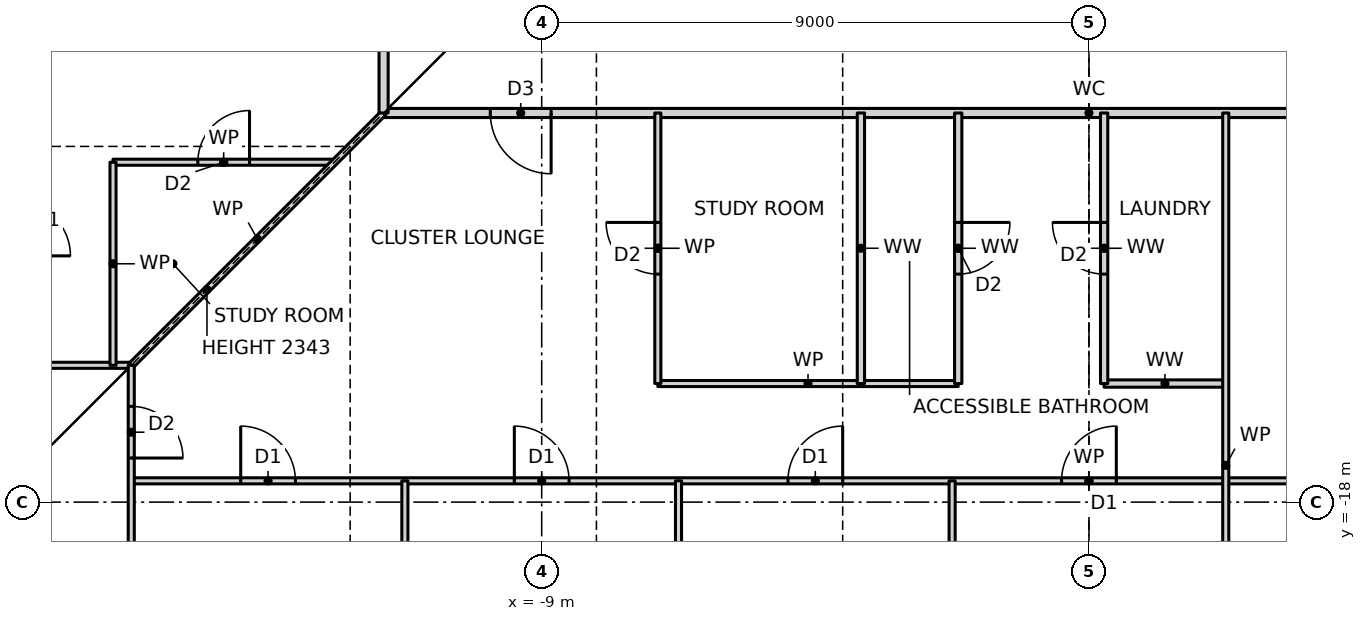
"""IFC4 building model, lengths in metres.
Left out: names, types, materials, properties, quantities, classifications, styles, units other than length and angle.
Written with IfcOpenShell. Run it as: python <this file> out.ifc"""

import sys

from ifc_helpers import new_model, si_unit, direction, frame, frame_2d, origin, place, context, subcontext, project, spatial, rectangle, extrude, element, fill, save


model = new_model("IFC4")
c1 = context("Model", 3, precision=1e-05, world=origin(), true_north=direction((0.0, 1.0)))
c2 = subcontext(c1, "Body", "Model", "MODEL_VIEW")
j1 = project(units=[si_unit("LENGTHUNIT", "METRE"), si_unit("PLANEANGLEUNIT", "RADIAN")], contexts=[c1])
p1 = place(None, origin())
s1 = spatial("IfcSite", under=j1, at=p1, CompositionType="ELEMENT")
p2 = place(p1, origin())
s2 = spatial("IfcBuilding", under=s1, at=p2, CompositionType="ELEMENT")
p3 = place(p2, frame((0.0, 0.0, 57.0)))
s3 = spatial("IfcBuildingStorey", under=s2, at=p3, CompositionType="ELEMENT", Elevation=57.0)
p4 = place(p3, frame((-15.75, -17.65, 0.0), z_axis=(0.0, 0.0, 1.0), x_axis=(1.0, 0.0, 0.0)))
e1 = element("IfcWall", 1, at=p4, inside=s3, PredefinedType="PARTITIONING", context=c2, shape_type="SweptSolid", body=[
    extrude(rectangle(XDim=31.5, YDim=0.1, at=frame_2d((15.75, 0.0))), origin(), (0.0, 0.0, 1.0), 3.27),
])
p5 = place(p4, frame((1.8, 0.0, 0.0)))
e2 = element("IfcOpeningElement", 2, at=p5, cuts=e1, PredefinedType="OPENING", context=c2, shape_type="SweptSolid", body=[
    extrude(rectangle(XDim=0.9, YDim=2.1, at=frame_2d((0.45, 1.05))), frame((0.0, 0.06, 0.0), z_axis=(0.0, -1.0, 0.0), x_axis=(1.0, 0.0, 0.0)), (0.0, 0.0, 1.0), 0.12),
])
p6 = place(p4, frame((6.3, 0.0, 0.0)))
e3 = element("IfcOpeningElement", 3, at=p6, cuts=e1, PredefinedType="OPENING", context=c2, shape_type="SweptSolid", body=[
    extrude(rectangle(XDim=0.9, YDim=2.1, at=frame_2d((0.45, 1.05))), frame((0.0, 0.06, 0.0), z_axis=(0.0, -1.0, 0.0), x_axis=(1.0, 0.0, 0.0)), (0.0, 0.0, 1.0), 0.12),
])
p7 = place(p4, frame((10.8, 0.0, 0.0)))
e4 = element("IfcOpeningElement", 4, at=p7, cuts=e1, PredefinedType="OPENING", context=c2, shape_type="SweptSolid", body=[
    extrude(rectangle(XDim=0.9, YDim=2.1, at=frame_2d((0.45, 1.05))), frame((0.0, 0.06, 0.0), z_axis=(0.0, -1.0, 0.0), x_axis=(1.0, 0.0, 0.0)), (0.0, 0.0, 1.0), 0.12),
])
p8 = place(p4, frame((15.3, 0.0, 0.0)))
e5 = element("IfcOpeningElement", 5, at=p8, cuts=e1, PredefinedType="OPENING", context=c2, shape_type="SweptSolid", body=[
    extrude(rectangle(XDim=0.9, YDim=2.1, at=frame_2d((0.45, 1.05))), frame((0.0, 0.06, 0.0), z_axis=(0.0, -1.0, 0.0), x_axis=(1.0, 0.0, 0.0)), (0.0, 0.0, 1.0), 0.12),
])
p9 = place(p4, frame((19.8, 0.0, 0.0)))
e6 = element("IfcOpeningElement", 6, at=p9, cuts=e1, PredefinedType="OPENING", context=c2, shape_type="SweptSolid", body=[
    extrude(rectangle(XDim=0.9, YDim=2.1, at=frame_2d((0.45, 1.05))), frame((0.0, 0.06, 0.0), z_axis=(0.0, -1.0, 0.0), x_axis=(1.0, 0.0, 0.0)), (0.0, 0.0, 1.0), 0.12),
])
p10 = place(p4, frame((24.3, 0.0, 0.0)))
e7 = element("IfcOpeningElement", 7, at=p10, cuts=e1, PredefinedType="OPENING", context=c2, shape_type="SweptSolid", body=[
    extrude(rectangle(XDim=0.9, YDim=2.1, at=frame_2d((0.45, 1.05))), frame((0.0, 0.06, 0.0), z_axis=(0.0, -1.0, 0.0), x_axis=(1.0, 0.0, 0.0)), (0.0, 0.0, 1.0), 0.12),
])
p11 = place(p4, frame((28.8, 0.0, 0.0)))
e8 = element("IfcOpeningElement", 8, at=p11, cuts=e1, PredefinedType="OPENING", context=c2, shape_type="SweptSolid", body=[
    extrude(rectangle(XDim=0.9, YDim=2.1, at=frame_2d((0.45, 1.05))), frame((0.0, 0.06, 0.0), z_axis=(0.0, -1.0, 0.0), x_axis=(1.0, 0.0, 0.0)), (0.0, 0.0, 1.0), 0.12),
])
p12 = place(p3, frame((-7.09, -16.05, 0.0), z_axis=(0.0, 0.0, 1.0), x_axis=(1.0, 0.0, 0.0)))
e9 = element("IfcWall", 9, at=p12, inside=s3, PredefinedType="PARTITIONING", context=c2, shape_type="SweptSolid", body=[
    extrude(rectangle(XDim=4.94, YDim=0.1, at=frame_2d((2.47, 0.0))), origin(), (0.0, 0.0, 1.0), 3.27),
])
p13 = place(p3, frame((0.25, -16.05, 0.0), z_axis=(0.0, 0.0, 1.0), x_axis=(1.0, 0.0, 0.0)))
e10 = element("IfcWall", 10, at=p13, inside=s3, PredefinedType="PARTITIONING", context=c2, shape_type="SweptSolid", body=[
    extrude(rectangle(XDim=2.0, YDim=0.12, at=frame_2d((1.0, 0.0))), origin(), (0.0, 0.0, 1.0), 3.27),
])
p14 = place(p3, frame((-23.19, -15.75, 0.0), z_axis=(0.0, 0.0, 1.0), x_axis=(1.0, 0.0, 0.0)))
e11 = element("IfcWall", 11, at=p14, inside=s3, PredefinedType="PARTITIONING", context=c2, shape_type="SweptSolid", body=[
    extrude(rectangle(XDim=7.44, YDim=0.1, at=frame_2d((3.72, 0.0))), origin(), (0.0, 0.0, 1.0), 3.27),
])
p15 = place(p3, frame((-16.05, -12.41, 0.0), z_axis=(0.0, 0.0, 1.0), x_axis=(1.0, 0.0, 0.0)))
e12 = element("IfcWall", 12, at=p15, inside=s3, PredefinedType="PARTITIONING", context=c2, shape_type="SweptSolid", body=[
    extrude(rectangle(XDim=3.64, YDim=0.1, at=frame_2d((1.82, 0.0))), origin(), (0.0, 0.0, 1.0), 3.27),
])
p16 = place(p15, frame((1.395, 0.0, 0.0)))
e13 = element("IfcOpeningElement", 13, at=p16, cuts=e12, PredefinedType="OPENING", context=c2, shape_type="SweptSolid", body=[
    extrude(rectangle(XDim=0.85, YDim=2.1, at=frame_2d((0.425, 1.05))), frame((0.0, 0.06, 0.0), z_axis=(0.0, -1.0, 0.0), x_axis=(1.0, 0.0, 0.0)), (0.0, 0.0, 1.0), 0.12),
])
p17 = place(p3, frame((-11.6, -11.6, 0.0), z_axis=(0.0, 0.0, 1.0), x_axis=(1.0, 0.0, 0.0)))
e14 = element("IfcWall", 14, at=p17, inside=s3, PredefinedType="PARTITIONING", context=c2, shape_type="SweptSolid", body=[
    extrude(rectangle(XDim=23.2, YDim=0.15, at=frame_2d((11.6, 0.0))), origin(), (0.0, 0.0, 1.0), 3.27),
])
p18 = place(p17, frame((1.755, 0.0, 0.0)))
e15 = element("IfcOpeningElement", 15, at=p18, cuts=e14, PredefinedType="OPENING", context=c2, shape_type="SweptSolid", body=[
    extrude(rectangle(XDim=1.0, YDim=2.1, at=frame_2d((0.5, 1.05))), frame((0.0, 0.085, 0.0), z_axis=(0.0, -1.0, 0.0), x_axis=(1.0, 0.0, 0.0)), (0.0, 0.0, 1.0), 0.17),
])
p19 = place(p17, frame((21.025, 0.0, 0.0)))
e16 = element("IfcOpeningElement", 16, at=p19, cuts=e14, PredefinedType="OPENING", context=c2, shape_type="SweptSolid", body=[
    extrude(rectangle(XDim=1.0, YDim=2.1, at=frame_2d((0.5, 1.05))), frame((0.0, 0.085, 0.0), z_axis=(0.0, -1.0, 0.0), x_axis=(1.0, 0.0, 0.0)), (0.0, 0.0, 1.0), 0.17),
])
p20 = place(p3, frame((-15.75, -15.75, 0.0), z_axis=(0.0, 0.0, 1.0), x_axis=(0.707106781187, 0.707106781187, 0.0)))
e17 = element("IfcWall", 17, at=p20, inside=s3, PredefinedType="PARTITIONING", context=c2, shape_type="SweptSolid", body=[
    extrude(rectangle(XDim=5.869, YDim=0.1, at=frame_2d((2.935, 0.0))), origin(), (0.0, 0.0, 1.0), 2.343),
])
p21 = place(p3, frame((2.25, -23.19, 0.0), z_axis=(0.0, 0.0, 1.0), x_axis=(0.0, 1.0, 0.0)))
e18 = element("IfcWall", 18, at=p21, inside=s3, PredefinedType="PARTITIONING", context=c2, shape_type="SweptSolid", body=[
    extrude(rectangle(XDim=11.59, YDim=0.1, at=frame_2d((5.795, 0.0))), origin(), (0.0, 0.0, 1.0), 3.27),
])
p22 = place(p3, frame((0.25, -16.05, 0.0), z_axis=(0.0, 0.0, 1.0), x_axis=(0.0, 1.0, 0.0)))
e19 = element("IfcWall", 19, at=p22, inside=s3, PredefinedType="PARTITIONING", context=c2, shape_type="SweptSolid", body=[
    extrude(rectangle(XDim=4.45, YDim=0.12, at=frame_2d((2.225, 0.0))), origin(), (0.0, 0.0, 1.0), 3.27),
])
p23 = place(p22, frame((1.8, 0.0, 0.0)))
e20 = element("IfcOpeningElement", 20, at=p23, cuts=e19, PredefinedType="OPENING", context=c2, shape_type="SweptSolid", body=[
    extrude(rectangle(XDim=0.85, YDim=2.1, at=frame_2d((0.425, 1.05))), frame((0.0, 0.07, 0.0), z_axis=(0.0, -1.0, 0.0), x_axis=(1.0, 0.0, 0.0)), (0.0, 0.0, 1.0), 0.14),
])
p24 = place(p3, frame((-2.15, -16.05, 0.0), z_axis=(0.0, 0.0, 1.0), x_axis=(0.0, 1.0, 0.0)))
e21 = element("IfcWall", 21, at=p24, inside=s3, PredefinedType="PARTITIONING", context=c2, shape_type="SweptSolid", body=[
    extrude(rectangle(XDim=4.45, YDim=0.12, at=frame_2d((2.225, 0.0))), origin(), (0.0, 0.0, 1.0), 3.27),
])
p25 = place(p24, frame((1.8, 0.0, 0.0)))
e22 = element("IfcOpeningElement", 22, at=p25, cuts=e21, PredefinedType="OPENING", context=c2, shape_type="SweptSolid", body=[
    extrude(rectangle(XDim=0.85, YDim=2.1, at=frame_2d((0.425, 1.05))), frame((0.0, 0.07, 0.0), z_axis=(0.0, -1.0, 0.0), x_axis=(1.0, 0.0, 0.0)), (0.0, 0.0, 1.0), 0.14),
])
p26 = place(p3, frame((-2.25, -23.19, 0.0), z_axis=(0.0, 0.0, 1.0), x_axis=(0.0, 1.0, 0.0)))
e23 = element("IfcWall", 23, at=p26, inside=s3, PredefinedType="PARTITIONING", context=c2, shape_type="SweptSolid", body=[
    extrude(rectangle(XDim=5.54, YDim=0.1, at=frame_2d((2.77, 0.0))), origin(), (0.0, 0.0, 1.0), 3.27),
])
p27 = place(p3, frame((-3.75, -16.05, 0.0), z_axis=(0.0, 0.0, 1.0), x_axis=(0.0, 1.0, 0.0)))
e24 = element("IfcWall", 24, at=p27, inside=s3, PredefinedType="PARTITIONING", context=c2, shape_type="SweptSolid", body=[
    extrude(rectangle(XDim=4.45, YDim=0.12, at=frame_2d((2.225, 0.0))), origin(), (0.0, 0.0, 1.0), 3.27),
])
p28 = place(p3, frame((-6.75, -23.19, 0.0), z_axis=(0.0, 0.0, 1.0), x_axis=(0.0, 1.0, 0.0)))
e25 = element("IfcWall", 25, at=p28, inside=s3, PredefinedType="PARTITIONING", context=c2, shape_type="SweptSolid", body=[
    extrude(rectangle(XDim=5.54, YDim=0.1, at=frame_2d((2.77, 0.0))), origin(), (0.0, 0.0, 1.0), 3.27),
])
p29 = place(p3, frame((-7.09, -16.05, 0.0), z_axis=(0.0, 0.0, 1.0), x_axis=(0.0, 1.0, 0.0)))
e26 = element("IfcWall", 26, at=p29, inside=s3, PredefinedType="PARTITIONING", context=c2, shape_type="SweptSolid", body=[
    extrude(rectangle(XDim=4.45, YDim=0.1, at=frame_2d((2.225, 0.0))), origin(), (0.0, 0.0, 1.0), 3.27),
])
p30 = place(p29, frame((1.8, 0.0, 0.0)))
e27 = element("IfcOpeningElement", 27, at=p30, cuts=e26, PredefinedType="OPENING", context=c2, shape_type="SweptSolid", body=[
    extrude(rectangle(XDim=0.85, YDim=2.1, at=frame_2d((0.425, 1.05))), frame((0.0, 0.06, 0.0), z_axis=(0.0, -1.0, 0.0), x_axis=(1.0, 0.0, 0.0)), (0.0, 0.0, 1.0), 0.12),
])
p31 = place(p3, frame((-11.25, -23.19, 0.0), z_axis=(0.0, 0.0, 1.0), x_axis=(0.0, 1.0, 0.0)))
e28 = element("IfcWall", 28, at=p31, inside=s3, PredefinedType="PARTITIONING", context=c2, shape_type="SweptSolid", body=[
    extrude(rectangle(XDim=5.54, YDim=0.1, at=frame_2d((2.77, 0.0))), origin(), (0.0, 0.0, 1.0), 3.27),
])
p32 = place(p3, frame((-11.6, -11.6, 0.0), z_axis=(0.0, 0.0, 1.0), x_axis=(0.0, 1.0, 0.0)))
e29 = element("IfcWall", 29, at=p32, inside=s3, PredefinedType="PARTITIONING", context=c2, shape_type="SweptSolid", body=[
    extrude(rectangle(XDim=24.2, YDim=0.15, at=frame_2d((12.1, 0.0))), origin(), (0.0, 0.0, 1.0), 3.27),
])
p33 = place(p32, frame((20.125, 0.0, 0.0)))
e30 = element("IfcOpeningElement", 30, at=p33, cuts=e29, PredefinedType="OPENING", context=c2, shape_type="SweptSolid", body=[
    extrude(rectangle(XDim=1.0, YDim=2.1, at=frame_2d((0.5, 1.05))), frame((0.0, 0.085, 0.0), z_axis=(0.0, -1.0, 0.0), x_axis=(1.0, 0.0, 0.0)), (0.0, 0.0, 1.0), 0.17),
])
p34 = place(p32, frame((14.3, 0.0, 0.0)))
e31 = element("IfcOpeningElement", 31, at=p34, cuts=e29, PredefinedType="OPENING", context=c2, shape_type="SweptSolid", body=[
    extrude(rectangle(XDim=0.9, YDim=2.1, at=frame_2d((0.45, 1.05))), frame((0.0, 0.085, 0.0), z_axis=(0.0, -1.0, 0.0), x_axis=(1.0, 0.0, 0.0)), (0.0, 0.0, 1.0), 0.17),
])
p35 = place(p32, frame((3.425, 0.0, 0.0)))
e32 = element("IfcOpeningElement", 32, at=p35, cuts=e29, PredefinedType="OPENING", context=c2, shape_type="SweptSolid", body=[
    extrude(rectangle(XDim=1.0, YDim=2.1, at=frame_2d((0.5, 1.05))), frame((0.0, 0.085, 0.0), z_axis=(0.0, -1.0, 0.0), x_axis=(1.0, 0.0, 0.0)), (0.0, 0.0, 1.0), 0.17),
])
p36 = place(p3, frame((-15.75, -23.19, 0.0), z_axis=(0.0, 0.0, 1.0), x_axis=(0.0, 1.0, 0.0)))
e33 = element("IfcWall", 33, at=p36, inside=s3, PredefinedType="PARTITIONING", context=c2, shape_type="SweptSolid", body=[
    extrude(rectangle(XDim=7.44, YDim=0.1, at=frame_2d((3.72, 0.0))), origin(), (0.0, 0.0, 1.0), 3.27),
])
p37 = place(p36, frame((5.915, 0.0, 0.0)))
e34 = element("IfcOpeningElement", 34, at=p37, cuts=e33, PredefinedType="OPENING", context=c2, shape_type="SweptSolid", body=[
    extrude(rectangle(XDim=0.85, YDim=2.1, at=frame_2d((0.425, 1.05))), frame((0.0, 0.06, 0.0), z_axis=(0.0, -1.0, 0.0), x_axis=(1.0, 0.0, 0.0)), (0.0, 0.0, 1.0), 0.12),
])
p38 = place(p3, frame((-16.05, -15.75, 0.0), z_axis=(0.0, 0.0, 1.0), x_axis=(0.0, 1.0, 0.0)))
e35 = element("IfcWall", 35, at=p38, inside=s3, PredefinedType="PARTITIONING", context=c2, shape_type="SweptSolid", body=[
    extrude(rectangle(XDim=3.34, YDim=0.1, at=frame_2d((1.67, 0.0))), origin(), (0.0, 0.0, 1.0), 3.27),
])
p39 = place(p5, origin())
e36 = element("IfcDoor", 36, at=p39, inside=s3, OperationType="SINGLE_SWING_LEFT", PredefinedType="DOOR", context=c2, shape_type="SweptSolid", body=[
    extrude(rectangle(XDim=0.9, YDim=2.1, at=frame_2d((0.45, 1.05))), frame((0.0, 0.025, 0.0), z_axis=(0.0, -1.0, 0.0), x_axis=(1.0, 0.0, 0.0)), (0.0, 0.0, 1.0), 0.05),
])
fill(e2, e36)
p40 = place(p6, origin())
e37 = element("IfcDoor", 37, at=p40, inside=s3, OperationType="SINGLE_SWING_LEFT", PredefinedType="DOOR", context=c2, shape_type="SweptSolid", body=[
    extrude(rectangle(XDim=0.9, YDim=2.1, at=frame_2d((0.45, 1.05))), frame((0.0, 0.025, 0.0), z_axis=(0.0, -1.0, 0.0), x_axis=(1.0, 0.0, 0.0)), (0.0, 0.0, 1.0), 0.05),
])
fill(e3, e37)
p41 = place(p7, origin())
e38 = element("IfcDoor", 38, at=p41, inside=s3, OperationType="SINGLE_SWING_RIGHT", PredefinedType="DOOR", context=c2, shape_type="SweptSolid", body=[
    extrude(rectangle(XDim=0.9, YDim=2.1, at=frame_2d((0.45, 1.05))), frame((0.0, 0.025, 0.0), z_axis=(0.0, -1.0, 0.0), x_axis=(1.0, 0.0, 0.0)), (0.0, 0.0, 1.0), 0.05),
])
fill(e4, e38)
p42 = place(p8, origin())
e39 = element("IfcDoor", 39, at=p42, inside=s3, OperationType="SINGLE_SWING_RIGHT", PredefinedType="DOOR", context=c2, shape_type="SweptSolid", body=[
    extrude(rectangle(XDim=0.9, YDim=2.1, at=frame_2d((0.45, 1.05))), frame((0.0, 0.025, 0.0), z_axis=(0.0, -1.0, 0.0), x_axis=(1.0, 0.0, 0.0)), (0.0, 0.0, 1.0), 0.05),
])
fill(e5, e39)
p43 = place(p18, frame((1.0, 0.0, 0.0), z_axis=(0.0, 0.0, 1.0), x_axis=(-1.0, 0.0, 0.0)))
e40 = element("IfcDoor", 40, at=p43, inside=s3, OperationType="SINGLE_SWING_LEFT", PredefinedType="DOOR", context=c2, shape_type="SweptSolid", body=[
    extrude(rectangle(XDim=1.0, YDim=2.1, at=frame_2d((0.5, 1.05))), frame((0.0, 0.025, 0.0), z_axis=(0.0, -1.0, 0.0), x_axis=(1.0, 0.0, 0.0)), (0.0, 0.0, 1.0), 0.05),
])
fill(e15, e40)
p44 = place(p30, origin())
e41 = element("IfcDoor", 41, at=p44, inside=s3, OperationType="SINGLE_SWING_RIGHT", PredefinedType="DOOR", context=c2, shape_type="SweptSolid", body=[
    extrude(rectangle(XDim=0.85, YDim=2.1, at=frame_2d((0.425, 1.05))), frame((0.0, 0.025, 0.0), z_axis=(0.0, -1.0, 0.0), x_axis=(1.0, 0.0, 0.0)), (0.0, 0.0, 1.0), 0.05),
])
fill(e27, e41)
p45 = place(p25, frame((0.85, 0.0, 0.0), z_axis=(0.0, 0.0, 1.0), x_axis=(-1.0, 0.0, 0.0)))
e42 = element("IfcDoor", 42, at=p45, inside=s3, OperationType="SINGLE_SWING_LEFT", PredefinedType="DOOR", context=c2, shape_type="SweptSolid", body=[
    extrude(rectangle(XDim=0.85, YDim=2.1, at=frame_2d((0.425, 1.05))), frame((0.0, 0.025, 0.0), z_axis=(0.0, -1.0, 0.0), x_axis=(1.0, 0.0, 0.0)), (0.0, 0.0, 1.0), 0.05),
])
fill(e22, e42)
p46 = place(p23, origin())
e43 = element("IfcDoor", 43, at=p46, inside=s3, OperationType="SINGLE_SWING_RIGHT", PredefinedType="DOOR", context=c2, shape_type="SweptSolid", body=[
    extrude(rectangle(XDim=0.85, YDim=2.1, at=frame_2d((0.425, 1.05))), frame((0.0, 0.025, 0.0), z_axis=(0.0, -1.0, 0.0), x_axis=(1.0, 0.0, 0.0)), (0.0, 0.0, 1.0), 0.05),
])
fill(e20, e43)
p47 = place(p16, origin())
e44 = element("IfcDoor", 44, at=p47, inside=s3, OperationType="SINGLE_SWING_RIGHT", PredefinedType="DOOR", context=c2, shape_type="SweptSolid", body=[
    extrude(rectangle(XDim=0.85, YDim=2.1, at=frame_2d((0.425, 1.05))), frame((0.0, 0.025, 0.0), z_axis=(0.0, -1.0, 0.0), x_axis=(1.0, 0.0, 0.0)), (0.0, 0.0, 1.0), 0.05),
])
fill(e13, e44)
p48 = place(p37, frame((0.85, 0.0, 0.0), z_axis=(0.0, 0.0, 1.0), x_axis=(-1.0, 0.0, 0.0)))
e45 = element("IfcDoor", 45, at=p48, inside=s3, OperationType="SINGLE_SWING_RIGHT", PredefinedType="DOOR", context=c2, shape_type="SweptSolid", body=[
    extrude(rectangle(XDim=0.85, YDim=2.1, at=frame_2d((0.425, 1.05))), frame((0.0, 0.025, 0.0), z_axis=(0.0, -1.0, 0.0), x_axis=(1.0, 0.0, 0.0)), (0.0, 0.0, 1.0), 0.05),
])
fill(e34, e45)
save(model, sys.argv[1])
